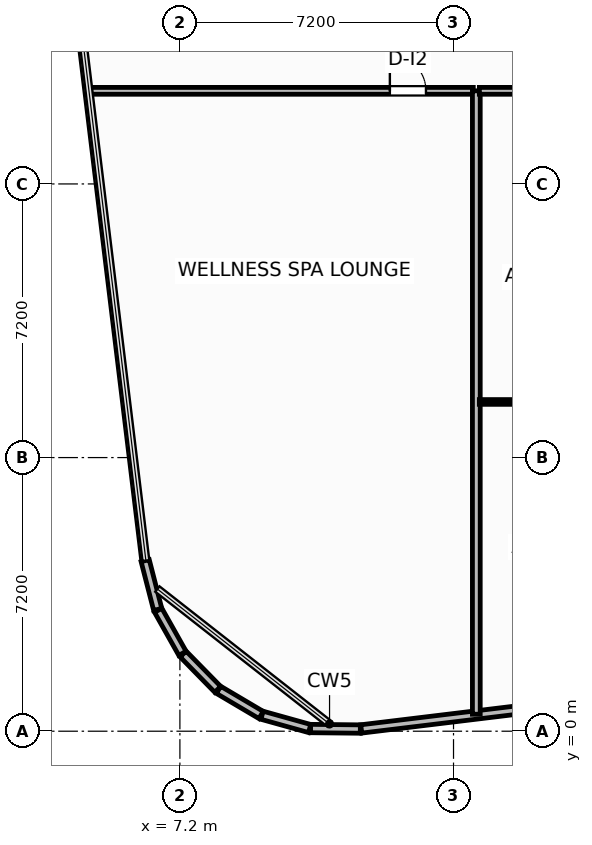
"""IFC4 building model, lengths in metres.
Left out: names, types, materials, properties, quantities, classifications, styles, units other than length and angle.
Written with IfcOpenShell. Run it as: python <this file> out.ifc"""

import sys

from ifc_helpers import new_model, si_unit, direction, frame, frame_2d, origin, place, context, subcontext, project, spatial, rectangle, extrude, element, fill, save


model = new_model("IFC4")
c1 = context("Model", 3, precision=1e-05, world=origin(), true_north=direction((0.0, 1.0)))
c2 = subcontext(c1, "Body", "Model", "MODEL_VIEW")
j1 = project(units=[si_unit("LENGTHUNIT", "METRE"), si_unit("PLANEANGLEUNIT", "RADIAN")], contexts=[c1])
p1 = place(None, origin())
s1 = spatial("IfcSite", under=j1, at=p1, CompositionType="ELEMENT")
p2 = place(p1, origin())
s2 = spatial("IfcBuilding", under=s1, at=p2, CompositionType="ELEMENT")
p3 = place(p2, frame((0.0, 0.0, 196.8)))
s3 = spatial("IfcBuildingStorey", under=s2, at=p3, CompositionType="ELEMENT", Elevation=196.8)
p4 = place(p3, frame((6.286, 4.488, 0.0), z_axis=(0.0, 0.0, 1.0), x_axis=(0.248942347653, -0.968518305219, 0.0)))
e1 = element("IfcWall", 1, at=p4, inside=s3, PredefinedType="SOLIDWALL", context=c2, shape_type="SweptSolid", body=[
    extrude(rectangle(XDim=1.326, YDim=0.22, at=frame_2d((0.663, 0.0))), origin(), (0.0, 0.0, 1.0), 2.73),
])
for number, where, z_axis, x_axis in (
    (2, (6.629, 3.182, 0.0), (0.0, 0.0, 1.0), (0.491, -0.871, 0.0)),
    (3, (7.285, 2.031, 0.0), (0.0, 0.0, 1.0), (0.7, -0.714, 0.0)),
    (4, (8.217, 1.089, 0.0), (0.0, 0.0, 1.0), (0.861, -0.509, 0.0)),
):
    element("IfcWall", number, at=place(p3, frame(where, z_axis=z_axis, x_axis=x_axis)), inside=s3, PredefinedType="SOLIDWALL", context=c2, shape_type="SweptSolid", body=[
        extrude(rectangle(XDim=1.301, YDim=0.22, at=frame_2d((0.65, 0.0))), origin(), (0.0, 0.0, 1.0), 2.73),
    ])
p5 = place(p3, frame((9.361, 0.42, 0.0), z_axis=(0.0, 0.0, 1.0), x_axis=(0.963218895288, -0.268717992997, 0.0)))
e5 = element("IfcWall", 5, at=p5, inside=s3, PredefinedType="SOLIDWALL", context=c2, shape_type="SweptSolid", body=[
    extrude(rectangle(XDim=1.301, YDim=0.22, at=frame_2d((0.65, 0.0))), origin(), (0.0, 0.0, 1.0), 2.73),
])
p6 = place(p3, frame((10.639, 0.07, 0.0), z_axis=(0.0, 0.0, 1.0), x_axis=(0.999947377741, -0.010258740119, 0.0)))
e6 = element("IfcWall", 6, at=p6, inside=s3, PredefinedType="SOLIDWALL", context=c2, shape_type="SweptSolid", body=[
    extrude(rectangle(XDim=1.309, YDim=0.22, at=frame_2d((0.654, 0.0))), origin(), (0.0, 0.0, 1.0), 2.73),
])
p7 = place(p3, frame((11.972, 0.06, 0.0), z_axis=(0.0, 0.0, 1.0), x_axis=(0.992732021049, 0.120345894751, 0.0)))
e7 = element("IfcWall", 7, at=p7, inside=s3, PredefinedType="SOLIDWALL", context=c2, shape_type="SweptSolid", body=[
    extrude(rectangle(XDim=12.547, YDim=0.22, at=frame_2d((6.274, 0.0))), origin(), (0.0, 0.0, 1.0), 2.73),
])
p8 = place(p7, frame((5.224, 0.0, 0.8)))
e8 = element("IfcOpeningElement", 8, at=p8, cuts=e7, PredefinedType="OPENING", context=c2, shape_type="SweptSolid", body=[
    extrude(rectangle(XDim=2.1, YDim=1.75, at=frame_2d((1.05, 0.875))), frame((0.0, 0.12, 0.0), z_axis=(0.0, -1.0, 0.0), x_axis=(1.0, 0.0, 0.0)), (0.0, 0.0, 1.0), 0.24),
])
p9 = place(p7, frame((8.225, 0.0, 0.8)))
e9 = element("IfcOpeningElement", 9, at=p9, cuts=e7, PredefinedType="OPENING", context=c2, shape_type="SweptSolid", body=[
    extrude(rectangle(XDim=1.15, YDim=1.4, at=frame_2d((0.575, 0.7))), frame((0.0, 0.12, 0.0), z_axis=(0.0, -1.0, 0.0), x_axis=(1.0, 0.0, 0.0)), (0.0, 0.0, 1.0), 0.24),
])
p10 = place(p3, frame((4.847, 16.85, 0.0), z_axis=(0.0, 0.0, 1.0), x_axis=(1.0, 0.0, 0.0)))
e10 = element("IfcWall", 10, at=p10, inside=s3, PredefinedType="PARTITIONING", context=c2, shape_type="SweptSolid", body=[
    extrude(rectangle(XDim=10.073, YDim=0.18, at=frame_2d((5.037, 0.0))), origin(), (0.0, 0.0, 1.0), 3.45),
])
p11 = place(p10, frame((7.878, 0.0, 0.0)))
e11 = element("IfcOpeningElement", 11, at=p11, cuts=e10, PredefinedType="OPENING", context=c2, shape_type="SweptSolid", body=[
    extrude(rectangle(XDim=0.95, YDim=2.05, at=frame_2d((0.475, 1.025))), frame((0.0, 0.1, 0.0), z_axis=(0.0, -1.0, 0.0), x_axis=(1.0, 0.0, 0.0)), (0.0, 0.0, 1.0), 0.2),
])
p12 = place(p3, frame((15.0, 0.447, 0.0), z_axis=(0.0, 0.0, 1.0), x_axis=(0.0, 1.0, 0.0)))
e12 = element("IfcWall", 12, at=p12, inside=s3, PredefinedType="PARTITIONING", context=c2, shape_type="SweptSolid", body=[
    extrude(rectangle(XDim=16.403, YDim=0.205, at=frame_2d((8.202, 0.0))), origin(), (0.0, 0.0, 1.0), 3.45),
])
p13 = place(p3, frame((15.08, 8.663, 0.0), z_axis=(0.0, 0.0, 1.0), x_axis=(1.0, 0.0, 0.0)))
e13 = element("IfcWall", 13, at=p13, inside=s3, PredefinedType="PARTITIONING", context=c2, shape_type="SweptSolid", body=[
    extrude(rectangle(XDim=4.735, YDim=0.125, at=frame_2d((2.368, 0.0))), origin(), (0.0, 0.0, 1.0), 3.45),
])
p14 = place(p13, frame((2.131, 0.0, 0.0)))
e14 = element("IfcOpeningElement", 14, at=p14, cuts=e13, PredefinedType="OPENING", context=c2, shape_type="SweptSolid", body=[
    extrude(rectangle(XDim=0.92, YDim=2.05, at=frame_2d((0.46, 1.025))), frame((0.0, 0.073, 0.0), z_axis=(0.0, -1.0, 0.0), x_axis=(1.0, 0.0, 0.0)), (0.0, 0.0, 1.0), 0.145),
])
p15 = place(p3, frame((15.08, 16.85, 0.0), z_axis=(0.0, 0.0, 1.0), x_axis=(1.0, 0.0, 0.0)))
e15 = element("IfcWall", 15, at=p15, inside=s3, PredefinedType="PARTITIONING", context=c2, shape_type="SweptSolid", body=[
    extrude(rectangle(XDim=8.34, YDim=0.18, at=frame_2d((4.17, 0.0))), origin(), (0.0, 0.0, 1.0), 3.45),
])
p16 = place(p15, frame((1.868, 0.0, 0.0)))
e16 = element("IfcOpeningElement", 16, at=p16, cuts=e15, PredefinedType="OPENING", context=c2, shape_type="SweptSolid", body=[
    extrude(rectangle(XDim=1.0, YDim=2.2, at=frame_2d((0.5, 1.1))), frame((0.0, 0.1, 0.0), z_axis=(0.0, -1.0, 0.0), x_axis=(1.0, 0.0, 0.0)), (0.0, 0.0, 1.0), 0.2),
])
p17 = place(p11, origin())
e17 = element("IfcDoor", 17, at=p17, inside=s3, OperationType="SINGLE_SWING_LEFT", PredefinedType="DOOR", context=c2, shape_type="SweptSolid", body=[
    extrude(rectangle(XDim=0.95, YDim=2.05, at=frame_2d((0.475, 1.025))), frame((0.0, 0.025, 0.0), z_axis=(0.0, -1.0, 0.0), x_axis=(1.0, 0.0, 0.0)), (0.0, 0.0, 1.0), 0.05),
])
fill(e11, e17)
save(model, sys.argv[1])
